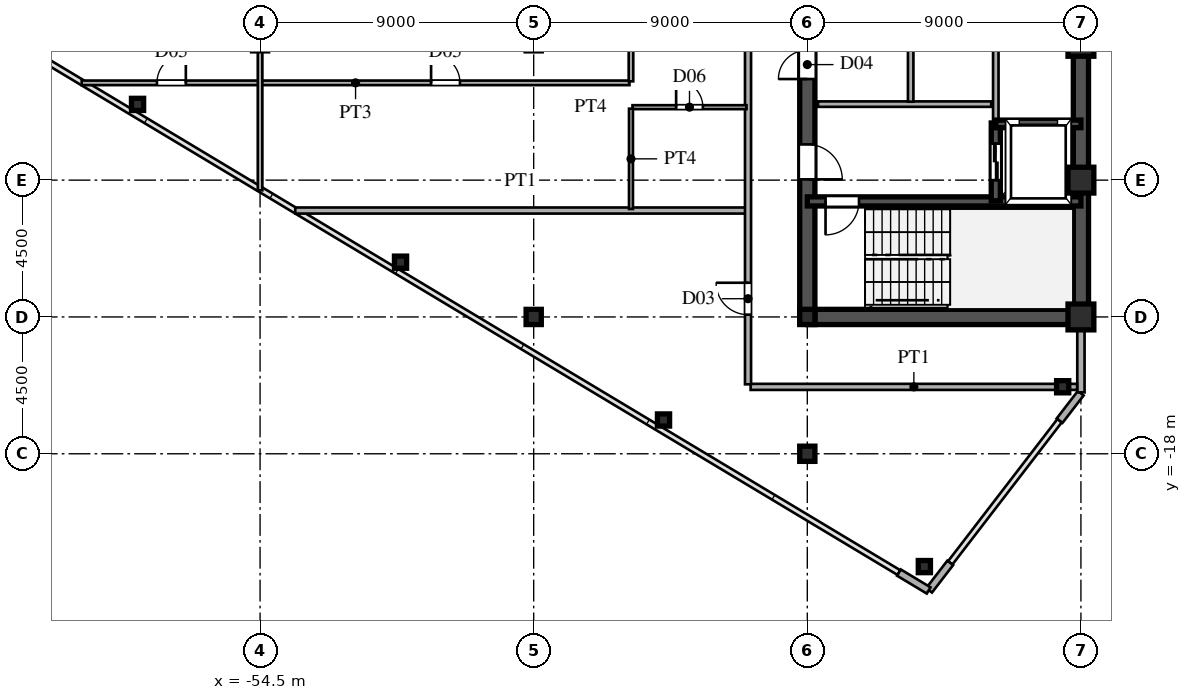
"""IFC4 building model, lengths in metres.
Left out: names, types, materials, properties, quantities, classifications, styles, units other than length and angle.
Written with IfcOpenShell. Run it as: python <this file> out.ifc"""

import sys

from ifc_helpers import new_model, si_unit, direction, frame, frame_2d, origin, origin_2d, place, context, subcontext, project, spatial, rectangle, hollow_rectangle, i_section, extrude, source, transform, mapped, element, fill, save


model = new_model("IFC4")
c1 = context("Model", 3, precision=1e-05, world=origin(), true_north=direction((0.0, 1.0)))
c2 = subcontext(c1, "Body", "Model", "MODEL_VIEW")
j1 = project(units=[si_unit("LENGTHUNIT", "METRE"), si_unit("PLANEANGLEUNIT", "RADIAN")], contexts=[c1])
p1 = place(None, origin())
s1 = spatial("IfcSite", under=j1, at=p1, CompositionType="ELEMENT")
p2 = place(p1, origin())
s2 = spatial("IfcBuilding", under=s1, at=p2, CompositionType="ELEMENT")
p3 = place(p2, frame((0.0, 0.0, 210.3)))
s3 = spatial("IfcBuildingStorey", under=s2, at=p3, CompositionType="ELEMENT", Elevation=210.3)
m1 = source(origin(), c2, "Body", "SweptSolid", [
    extrude(hollow_rectangle(XDim=0.85, YDim=0.85, WallThickness=0.036, at=origin_2d()), origin(), (0.0, 0.0, 1.0), 3.6),
])
for number, where, z_axis, x_axis in (
    (1, (-27.5, -13.5, 0.0), (0.0, 0.0, 1.0), (1.0, 0.0, 0.0)),
    (2, (-27.5, -9.0, 0.0), (0.0, 0.0, 1.0), (1.0, 0.0, 0.0)),
    (3, (-27.5, -4.5, 0.0), (0.0, 0.0, 1.0), (1.0, 0.0, 0.0)),
):
    element("IfcColumn", number, at=place(p3, frame(where, z_axis=z_axis, x_axis=x_axis)), inside=s3, PredefinedType="COLUMN", context=c2, shape_type="MappedRepresentation", body=[
        mapped(m1, transform((0.0, 0.0, 0.0), scale=1.0)),
    ])
m2 = source(origin(), c2, "Body", "SweptSolid", [
    extrude(i_section(OverallWidth=0.5, OverallDepth=0.5, WebThickness=0.02, FlangeThickness=0.032, at=origin_2d()), origin(), (0.0, 0.0, 1.0), 3.6),
])
for number, where, z_axis, x_axis in (
    (4, (-36.5, -18.0, 0.0), (0.0, 0.0, 1.0), (1.0, 0.0, 0.0)),
    (5, (-36.5, -13.5, 0.0), (0.0, 0.0, 1.0), (1.0, 0.0, 0.0)),
    (6, (-45.5, -13.5, 0.0), (0.0, 0.0, 1.0), (1.0, 0.0, 0.0)),
):
    element("IfcColumn", number, at=place(p3, frame(where, z_axis=z_axis, x_axis=x_axis)), inside=s3, PredefinedType="COLUMN", context=c2, shape_type="MappedRepresentation", body=[
        mapped(m2, transform((0.0, 0.0, 0.0), scale=1.0)),
    ])
m3 = source(origin(), c2, "Body", "SweptSolid", [
    extrude(hollow_rectangle(XDim=0.4, YDim=0.4, WallThickness=0.016, at=origin_2d()), origin(), (0.0, 0.0, 1.0), 3.6),
])
for number, where, z_axis, x_axis in (
    (7, (-28.1, -15.796, 0.0), (0.0, 0.0, 1.0), (1.0, 0.0, 0.0)),
    (8, (-32.65, -21.71, 0.0), (0.0, 0.0, 1.0), (1.0, 0.0, 0.0)),
    (9, (-41.23, -16.889, 0.0), (0.0, 0.0, 1.0), (1.0, 0.0, 0.0)),
    (10, (-49.88, -11.699, 0.0), (0.0, 0.0, 1.0), (1.0, 0.0, 0.0)),
    (11, (-58.53, -6.509, 0.0), (0.0, 0.0, 1.0), (1.0, 0.0, 0.0)),
):
    element("IfcColumn", number, at=place(p3, frame(where, z_axis=z_axis, x_axis=x_axis)), inside=s3, PredefinedType="COLUMN", context=c2, shape_type="MappedRepresentation", body=[
        mapped(m3, transform((0.0, 0.0, 0.0), scale=1.0)),
    ])
p4 = place(p3, frame((-27.5, -15.98, 0.0), z_axis=(0.0, 0.0, 1.0), x_axis=(0.0, 1.0, 0.0)))
e12 = element("IfcWall", 12, at=p4, inside=s3, PredefinedType="SOLIDWALL", context=c2, shape_type="SweptSolid", body=[
    extrude(rectangle(XDim=1.605, YDim=0.24, at=frame_2d((0.803, 0.0))), origin(), (0.0, 0.0, 1.0), 3.38),
])
p5 = place(p3, frame((-27.5, -14.375, 0.0), z_axis=(0.0, 0.0, 1.0), x_axis=(0.0, 1.0, 0.0)))
e13 = element("IfcWall", 13, at=p5, inside=s3, PredefinedType="SOLIDWALL", context=c2, shape_type="SweptSolid", body=[
    extrude(rectangle(XDim=0.62, YDim=0.24, at=frame_2d((0.31, 0.0))), origin(), (0.0, 0.0, 1.0), 2.88),
])
for number, where, z_axis, x_axis in (
    (14, (-33.486, -21.908, 0.0), (0.0, 0.0, 1.0), (0.857, -0.515, 0.0)),
    (15, (-32.494, -22.492, 0.0), (0.0, 0.0, 1.0), (0.61, 0.793, 0.0)),
    (16, (-28.201, -16.912, 0.0), (0.0, 0.0, 1.0), (0.61, 0.793, 0.0)),
):
    element("IfcWall", number, at=place(p3, frame(where, z_axis=z_axis, x_axis=x_axis)), inside=s3, PredefinedType="SOLIDWALL", context=c2, shape_type="SweptSolid", body=[
        extrude(rectangle(XDim=1.14, YDim=0.24, at=frame_2d((0.57, 0.0))), origin(), (0.0, 0.0, 1.0), 3.38),
    ])
p6 = place(p3, frame((-27.5, -13.5, 0.0), z_axis=(0.0, 0.0, 1.0), x_axis=(0.0, 1.0, 0.0)))
e17 = element("IfcWall", 17, at=p6, inside=s3, PredefinedType="SHEAR", context=c2, shape_type="SweptSolid", body=[
    extrude(rectangle(XDim=12.2, YDim=0.5, at=frame_2d((6.1, 0.0))), origin(), (0.0, 0.0, 1.0), 3.38),
])
p7 = place(p3, frame((-36.5, -13.5, 0.0), z_axis=(0.0, 0.0, 1.0), x_axis=(1.0, 0.0, 0.0)))
e18 = element("IfcWall", 18, at=p7, inside=s3, PredefinedType="SHEAR", context=c2, shape_type="SweptSolid", body=[
    extrude(rectangle(XDim=9.0, YDim=0.5, at=frame_2d((4.5, 0.0))), origin(), (0.0, 0.0, 1.0), 3.38),
])
p8 = place(p3, frame((-36.5, -13.65, 0.0), z_axis=(0.0, 0.0, 1.0), x_axis=(0.0, 1.0, 0.0)))
e19 = element("IfcWall", 19, at=p8, inside=s3, PredefinedType="SHEAR", context=c2, shape_type="SweptSolid", body=[
    extrude(rectangle(XDim=7.15, YDim=0.5, at=frame_2d((3.575, 0.0))), origin(), (0.0, 0.0, 1.0), 3.38),
])
p9 = place(p8, frame((4.675, 0.0, 0.0)))
e20 = element("IfcOpeningElement", 20, at=p9, cuts=e19, PredefinedType="OPENING", context=c2, shape_type="SweptSolid", body=[
    extrude(rectangle(XDim=1.15, YDim=2.2, at=frame_2d((0.575, 1.1))), frame((0.0, 0.26, 0.0), z_axis=(0.0, -1.0, 0.0), x_axis=(1.0, 0.0, 0.0)), (0.0, 0.0, 1.0), 0.52),
])
p10 = place(p3, frame((-36.5, -6.5, 0.0), z_axis=(0.0, 0.0, 1.0), x_axis=(0.0, 1.0, 0.0)))
e21 = element("IfcWall", 21, at=p10, inside=s3, PredefinedType="SHEAR", context=c2, shape_type="SweptSolid", body=[
    extrude(rectangle(XDim=2.6, YDim=0.5, at=frame_2d((1.3, 0.0))), origin(), (0.0, 0.0, 1.0), 3.38),
])
p11 = place(p10, frame((0.825, 0.0, 0.0)))
e22 = element("IfcOpeningElement", 22, at=p11, cuts=e21, PredefinedType="OPENING", context=c2, shape_type="SweptSolid", body=[
    extrude(rectangle(XDim=0.95, YDim=2.15, at=frame_2d((0.475, 1.075))), frame((0.0, 0.26, 0.0), z_axis=(0.0, -1.0, 0.0), x_axis=(1.0, 0.0, 0.0)), (0.0, 0.0, 1.0), 0.52),
])
p12 = place(p3, frame((-36.5, -9.7, 0.0), z_axis=(0.0, 0.0, 1.0), x_axis=(1.0, 0.0, 0.0)))
e23 = element("IfcWall", 23, at=p12, inside=s3, PredefinedType="SHEAR", context=c2, shape_type="SweptSolid", body=[
    extrude(rectangle(XDim=9.0, YDim=0.3, at=frame_2d((4.5, 0.0))), origin(), (0.0, 0.0, 1.0), 3.38),
])
p13 = place(p12, frame((0.6, 0.0, 0.0)))
e24 = element("IfcOpeningElement", 24, at=p13, cuts=e23, PredefinedType="OPENING", context=c2, shape_type="SweptSolid", body=[
    extrude(rectangle(XDim=1.1, YDim=2.2, at=frame_2d((0.55, 1.1))), frame((0.0, 0.16, 0.0), z_axis=(0.0, -1.0, 0.0), x_axis=(1.0, 0.0, 0.0)), (0.0, 0.0, 1.0), 0.32),
])
p14 = place(p3, frame((-30.3, -7.15, 0.0), z_axis=(0.0, 0.0, 1.0), x_axis=(1.0, 0.0, 0.0)))
e25 = element("IfcWall", 25, at=p14, inside=s3, PredefinedType="SHEAR", context=c2, shape_type="SweptSolid", body=[
    extrude(rectangle(XDim=2.8, YDim=0.25, at=frame_2d((1.4, 0.0))), origin(), (0.0, 0.0, 1.0), 3.38),
])
p15 = place(p3, frame((-30.3, -9.68, 0.0), z_axis=(0.0, 0.0, 1.0), x_axis=(0.0, 1.0, 0.0)))
e26 = element("IfcWall", 26, at=p15, inside=s3, PredefinedType="SHEAR", context=c2, shape_type="SweptSolid", body=[
    extrude(rectangle(XDim=2.56, YDim=0.3, at=frame_2d((1.28, 0.0))), origin(), (0.0, 0.0, 1.0), 3.38),
])
p16 = place(p15, frame((0.68, 0.0, 0.0)))
e27 = element("IfcOpeningElement", 27, at=p16, cuts=e26, PredefinedType="OPENING", context=c2, shape_type="SweptSolid", body=[
    extrude(rectangle(XDim=1.2, YDim=2.25, at=frame_2d((0.6, 1.125))), frame((0.0, 0.16, 0.0), z_axis=(0.0, -1.0, 0.0), x_axis=(1.0, 0.0, 0.0)), (0.0, 0.0, 1.0), 0.32),
])
p17 = place(p3, frame((-36.15, -6.5, 0.0), z_axis=(0.0, 0.0, 1.0), x_axis=(1.0, 0.0, 0.0)))
e28 = element("IfcWall", 28, at=p17, inside=s3, PredefinedType="PARTITIONING", context=c2, shape_type="SweptSolid", body=[
    extrude(rectangle(XDim=5.7, YDim=0.18, at=frame_2d((2.85, 0.0))), origin(), (0.0, 0.0, 1.0), 3.38),
])
p18 = place(p3, frame((-33.1, -6.42, 0.0), z_axis=(0.0, 0.0, 1.0), x_axis=(0.0, 1.0, 0.0)))
e29 = element("IfcWall", 29, at=p18, inside=s3, PredefinedType="PARTITIONING", context=c2, shape_type="SweptSolid", body=[
    extrude(rectangle(XDim=5.04, YDim=0.18, at=frame_2d((2.52, 0.0))), origin(), (0.0, 0.0, 1.0), 3.38),
])
p19 = place(p3, frame((-30.3, -7.12, 0.0), z_axis=(0.0, 0.0, 1.0), x_axis=(0.0, 1.0, 0.0)))
e30 = element("IfcWall", 30, at=p19, inside=s3, PredefinedType="PARTITIONING", context=c2, shape_type="SweptSolid", body=[
    extrude(rectangle(XDim=5.74, YDim=0.18, at=frame_2d((2.87, 0.0))), origin(), (0.0, 0.0, 1.0), 3.38),
])
p20 = place(p3, frame((-38.365, -15.8, 0.0), z_axis=(0.0, 0.0, 1.0), x_axis=(1.0, 0.0, 0.0)))
e31 = element("IfcWall", 31, at=p20, inside=s3, PredefinedType="PARTITIONING", context=c2, shape_type="SweptSolid", body=[
    extrude(rectangle(XDim=10.74, YDim=0.2, at=frame_2d((5.37, 0.0))), origin(), (0.0, 0.0, 1.0), 3.38),
])
p21 = place(p3, frame((-53.343, -10.0, 0.0), z_axis=(0.0, 0.0, 1.0), x_axis=(1.0, 0.0, 0.0)))
e32 = element("IfcWall", 32, at=p21, inside=s3, PredefinedType="PARTITIONING", context=c2, shape_type="SweptSolid", body=[
    extrude(rectangle(XDim=14.813, YDim=0.2, at=frame_2d((7.406, 0.0))), origin(), (0.0, 0.0, 1.0), 3.38),
])
p22 = place(p3, frame((-42.25, -6.6, 0.0), z_axis=(0.0, 0.0, 1.0), x_axis=(1.0, 0.0, 0.0)))
e33 = element("IfcWall", 33, at=p22, inside=s3, PredefinedType="PARTITIONING", context=c2, shape_type="SweptSolid", body=[
    extrude(rectangle(XDim=3.75, YDim=0.13, at=frame_2d((1.875, 0.0))), origin(), (0.0, 0.0, 1.0), 3.38),
])
p23 = place(p22, frame((1.435, 0.0, 0.0)))
e34 = element("IfcOpeningElement", 34, at=p23, cuts=e33, PredefinedType="OPENING", context=c2, shape_type="SweptSolid", body=[
    extrude(rectangle(XDim=0.88, YDim=2.1, at=frame_2d((0.44, 1.05))), frame((0.0, 0.075, 0.0), z_axis=(0.0, -1.0, 0.0), x_axis=(1.0, 0.0, 0.0)), (0.0, 0.0, 1.0), 0.15),
])
p24 = place(p3, frame((-60.368, -5.8, 0.0), z_axis=(0.0, 0.0, 1.0), x_axis=(1.0, 0.0, 0.0)))
e35 = element("IfcWall", 35, at=p24, inside=s3, PredefinedType="PARTITIONING", context=c2, shape_type="SweptSolid", body=[
    extrude(rectangle(XDim=18.018, YDim=0.15, at=frame_2d((9.009, 0.0))), origin(), (0.0, 0.0, 1.0), 3.38),
])
p25 = place(p24, frame((11.493, 0.0, 0.0)))
e36 = element("IfcOpeningElement", 36, at=p25, cuts=e35, PredefinedType="OPENING", context=c2, shape_type="SweptSolid", body=[
    extrude(rectangle(XDim=0.95, YDim=2.15, at=frame_2d((0.475, 1.075))), frame((0.0, 0.085, 0.0), z_axis=(0.0, -1.0, 0.0), x_axis=(1.0, 0.0, 0.0)), (0.0, 0.0, 1.0), 0.17),
])
p26 = place(p24, frame((2.476, 0.0, 0.0)))
e37 = element("IfcOpeningElement", 37, at=p26, cuts=e35, PredefinedType="OPENING", context=c2, shape_type="SweptSolid", body=[
    extrude(rectangle(XDim=0.95, YDim=2.15, at=frame_2d((0.475, 1.075))), frame((0.0, 0.085, 0.0), z_axis=(0.0, -1.0, 0.0), x_axis=(1.0, 0.0, 0.0)), (0.0, 0.0, 1.0), 0.17),
])
p27 = place(p3, frame((-54.5, -9.335, 0.0), z_axis=(0.0, 0.0, 1.0), x_axis=(0.0, 1.0, 0.0)))
e38 = element("IfcWall", 38, at=p27, inside=s3, PredefinedType="PARTITIONING", context=c2, shape_type="SweptSolid", body=[
    extrude(rectangle(XDim=11.885, YDim=0.15, at=frame_2d((5.942, 0.0))), origin(), (0.0, 0.0, 1.0), 2.78),
])
p28 = place(p27, frame((5.16, 0.0, 0.0)))
e39 = element("IfcOpeningElement", 39, at=p28, cuts=e38, PredefinedType="OPENING", context=c2, shape_type="SweptSolid", body=[
    extrude(rectangle(XDim=0.95, YDim=2.15, at=frame_2d((0.475, 1.075))), frame((0.0, 0.085, 0.0), z_axis=(0.0, -1.0, 0.0), x_axis=(1.0, 0.0, 0.0)), (0.0, 0.0, 1.0), 0.17),
])
p29 = place(p3, frame((-42.3, -9.95, 0.0), z_axis=(0.0, 0.0, 1.0), x_axis=(0.0, 1.0, 0.0)))
e40 = element("IfcWall", 40, at=p29, inside=s3, PredefinedType="PARTITIONING", context=c2, shape_type="SweptSolid", body=[
    extrude(rectangle(XDim=3.3, YDim=0.13, at=frame_2d((1.65, 0.0))), origin(), (0.0, 0.0, 1.0), 3.38),
])
p30 = place(p3, frame((-42.3, -5.75, 0.0), z_axis=(0.0, 0.0, 1.0), x_axis=(0.0, 1.0, 0.0)))
e41 = element("IfcWall", 41, at=p30, inside=s3, PredefinedType="PARTITIONING", context=c2, shape_type="SweptSolid", body=[
    extrude(rectangle(XDim=4.1, YDim=0.15, at=frame_2d((2.05, 0.0))), origin(), (0.0, 0.0, 1.0), 3.38),
])
p31 = place(p30, frame((1.575, 0.0, 0.0)))
e42 = element("IfcOpeningElement", 42, at=p31, cuts=e41, PredefinedType="OPENING", context=c2, shape_type="SweptSolid", body=[
    extrude(rectangle(XDim=0.95, YDim=2.15, at=frame_2d((0.475, 1.075))), frame((0.0, 0.085, 0.0), z_axis=(0.0, -1.0, 0.0), x_axis=(1.0, 0.0, 0.0)), (0.0, 0.0, 1.0), 0.17),
])
p32 = place(p3, frame((-38.45, -15.715, 0.0), z_axis=(0.0, 0.0, 1.0), x_axis=(0.0, 1.0, 0.0)))
e43 = element("IfcWall", 43, at=p32, inside=s3, PredefinedType="PARTITIONING", context=c2, shape_type="SweptSolid", body=[
    extrude(rectangle(XDim=31.43, YDim=0.2, at=frame_2d((15.715, 0.0))), origin(), (0.0, 0.0, 1.0), 3.38),
])
p33 = place(p32, frame((2.29, 0.0, 0.0)))
e44 = element("IfcOpeningElement", 44, at=p33, cuts=e43, PredefinedType="OPENING", context=c2, shape_type="SweptSolid", body=[
    extrude(rectangle(XDim=1.05, YDim=2.25, at=frame_2d((0.525, 1.125))), frame((0.0, 0.11, 0.0), z_axis=(0.0, -1.0, 0.0), x_axis=(1.0, 0.0, 0.0)), (0.0, 0.0, 1.0), 0.22),
])
p34 = place(p32, frame((11.301, 0.0, 0.0)))
e45 = element("IfcOpeningElement", 45, at=p34, cuts=e43, PredefinedType="OPENING", context=c2, shape_type="SweptSolid", body=[
    extrude(rectangle(XDim=1.05, YDim=2.25, at=frame_2d((0.525, 1.125))), frame((0.0, 0.11, 0.0), z_axis=(0.0, -1.0, 0.0), x_axis=(1.0, 0.0, 0.0)), (0.0, 0.0, 1.0), 0.22),
])
p35 = place(p32, frame((24.39, 0.0, 0.0)))
e46 = element("IfcOpeningElement", 46, at=p35, cuts=e43, PredefinedType="OPENING", context=c2, shape_type="SweptSolid", body=[
    extrude(rectangle(XDim=1.05, YDim=2.25, at=frame_2d((0.525, 1.125))), frame((0.0, 0.11, 0.0), z_axis=(0.0, -1.0, 0.0), x_axis=(1.0, 0.0, 0.0)), (0.0, 0.0, 1.0), 0.22),
])
m4 = source(origin(), c2, "Body", "SweptSolid", [
    extrude(rectangle(XDim=1.15, YDim=2.2, at=frame_2d((0.575, 1.1))), frame((0.0, 0.025, 0.0), z_axis=(0.0, -1.0, 0.0), x_axis=(1.0, 0.0, 0.0)), (0.0, 0.0, 1.0), 0.05),
])
p36 = place(p9, frame((1.15, 0.0, 0.0), z_axis=(0.0, 0.0, 1.0), x_axis=(-1.0, 0.0, 0.0)))
e47 = element("IfcDoor", 47, at=p36, inside=s3, OperationType="SINGLE_SWING_LEFT", PredefinedType="DOOR", context=c2, shape_type="MappedRepresentation", body=[
    mapped(m4, transform((0.0, 0.0, 0.0), scale=1.0)),
])
fill(e20, e47)
m5 = source(origin(), c2, "Body", "SweptSolid", [
    extrude(rectangle(XDim=0.95, YDim=2.15, at=frame_2d((0.475, 1.075))), frame((0.0, 0.025, 0.0), z_axis=(0.0, -1.0, 0.0), x_axis=(1.0, 0.0, 0.0)), (0.0, 0.0, 1.0), 0.05),
])
p37 = place(p11, origin())
e48 = element("IfcDoor", 48, at=p37, inside=s3, OperationType="SINGLE_SWING_LEFT", PredefinedType="DOOR", context=c2, shape_type="MappedRepresentation", body=[
    mapped(m5, transform((0.0, 0.0, 0.0), scale=1.0)),
])
fill(e22, e48)
m6 = source(origin(), c2, "Body", "SweptSolid", [
    extrude(rectangle(XDim=1.1, YDim=2.2, at=frame_2d((0.55, 1.1))), frame((0.0, 0.025, 0.0), z_axis=(0.0, -1.0, 0.0), x_axis=(1.0, 0.0, 0.0)), (0.0, 0.0, 1.0), 0.05),
])
p38 = place(p13, frame((1.1, 0.0, 0.0), z_axis=(0.0, 0.0, 1.0), x_axis=(-1.0, 0.0, 0.0)))
e49 = element("IfcDoor", 49, at=p38, inside=s3, OperationType="SINGLE_SWING_LEFT", PredefinedType="DOOR", context=c2, shape_type="MappedRepresentation", body=[
    mapped(m6, transform((0.0, 0.0, 0.0), scale=1.0)),
])
fill(e24, e49)
m7 = source(origin(), c2, "Body", "SweptSolid", [
    extrude(rectangle(XDim=1.2, YDim=2.25, at=frame_2d((0.6, 1.125))), frame((0.0, 0.025, 0.0), z_axis=(0.0, -1.0, 0.0), x_axis=(1.0, 0.0, 0.0)), (0.0, 0.0, 1.0), 0.05),
])
p39 = place(p16, origin())
e50 = element("IfcDoor", 50, at=p39, inside=s3, OperationType="DOUBLE_DOOR_SLIDING", PredefinedType="DOOR", context=c2, shape_type="MappedRepresentation", body=[
    mapped(m7, transform((0.0, 0.0, 0.0), scale=1.0)),
])
fill(e27, e50)
m8 = source(origin(), c2, "Body", "SweptSolid", [
    extrude(rectangle(XDim=0.88, YDim=2.1, at=frame_2d((0.44, 1.05))), frame((0.0, 0.025, 0.0), z_axis=(0.0, -1.0, 0.0), x_axis=(1.0, 0.0, 0.0)), (0.0, 0.0, 1.0), 0.05),
])
p40 = place(p23, origin())
e51 = element("IfcDoor", 51, at=p40, inside=s3, OperationType="SINGLE_SWING_LEFT", PredefinedType="DOOR", context=c2, shape_type="MappedRepresentation", body=[
    mapped(m8, transform((0.0, 0.0, 0.0), scale=1.0)),
])
fill(e34, e51)
m9 = source(origin(), c2, "Body", "SweptSolid", [
    extrude(rectangle(XDim=0.95, YDim=2.15, at=frame_2d((0.475, 1.075))), frame((0.0, 0.025, 0.0), z_axis=(0.0, -1.0, 0.0), x_axis=(1.0, 0.0, 0.0)), (0.0, 0.0, 1.0), 0.05),
])
p41 = place(p25, origin())
e52 = element("IfcDoor", 52, at=p41, inside=s3, OperationType="SINGLE_SWING_LEFT", PredefinedType="DOOR", context=c2, shape_type="MappedRepresentation", body=[
    mapped(m9, transform((0.0, 0.0, 0.0), scale=1.0)),
])
fill(e36, e52)
p42 = place(p26, origin())
e53 = element("IfcDoor", 53, at=p42, inside=s3, OperationType="SINGLE_SWING_RIGHT", PredefinedType="DOOR", context=c2, shape_type="MappedRepresentation", body=[
    mapped(m9, transform((0.0, 0.0, 0.0), scale=1.0)),
])
fill(e37, e53)
m10 = source(origin(), c2, "Body", "SweptSolid", [
    extrude(rectangle(XDim=1.05, YDim=2.25, at=frame_2d((0.525, 1.125))), frame((0.0, 0.025, 0.0), z_axis=(0.0, -1.0, 0.0), x_axis=(1.0, 0.0, 0.0)), (0.0, 0.0, 1.0), 0.05),
])
p43 = place(p33, origin())
e54 = element("IfcDoor", 54, at=p43, inside=s3, OperationType="SINGLE_SWING_RIGHT", PredefinedType="DOOR", context=c2, shape_type="MappedRepresentation", body=[
    mapped(m10, transform((0.0, 0.0, 0.0), scale=1.0)),
])
fill(e44, e54)
save(model, sys.argv[1])
